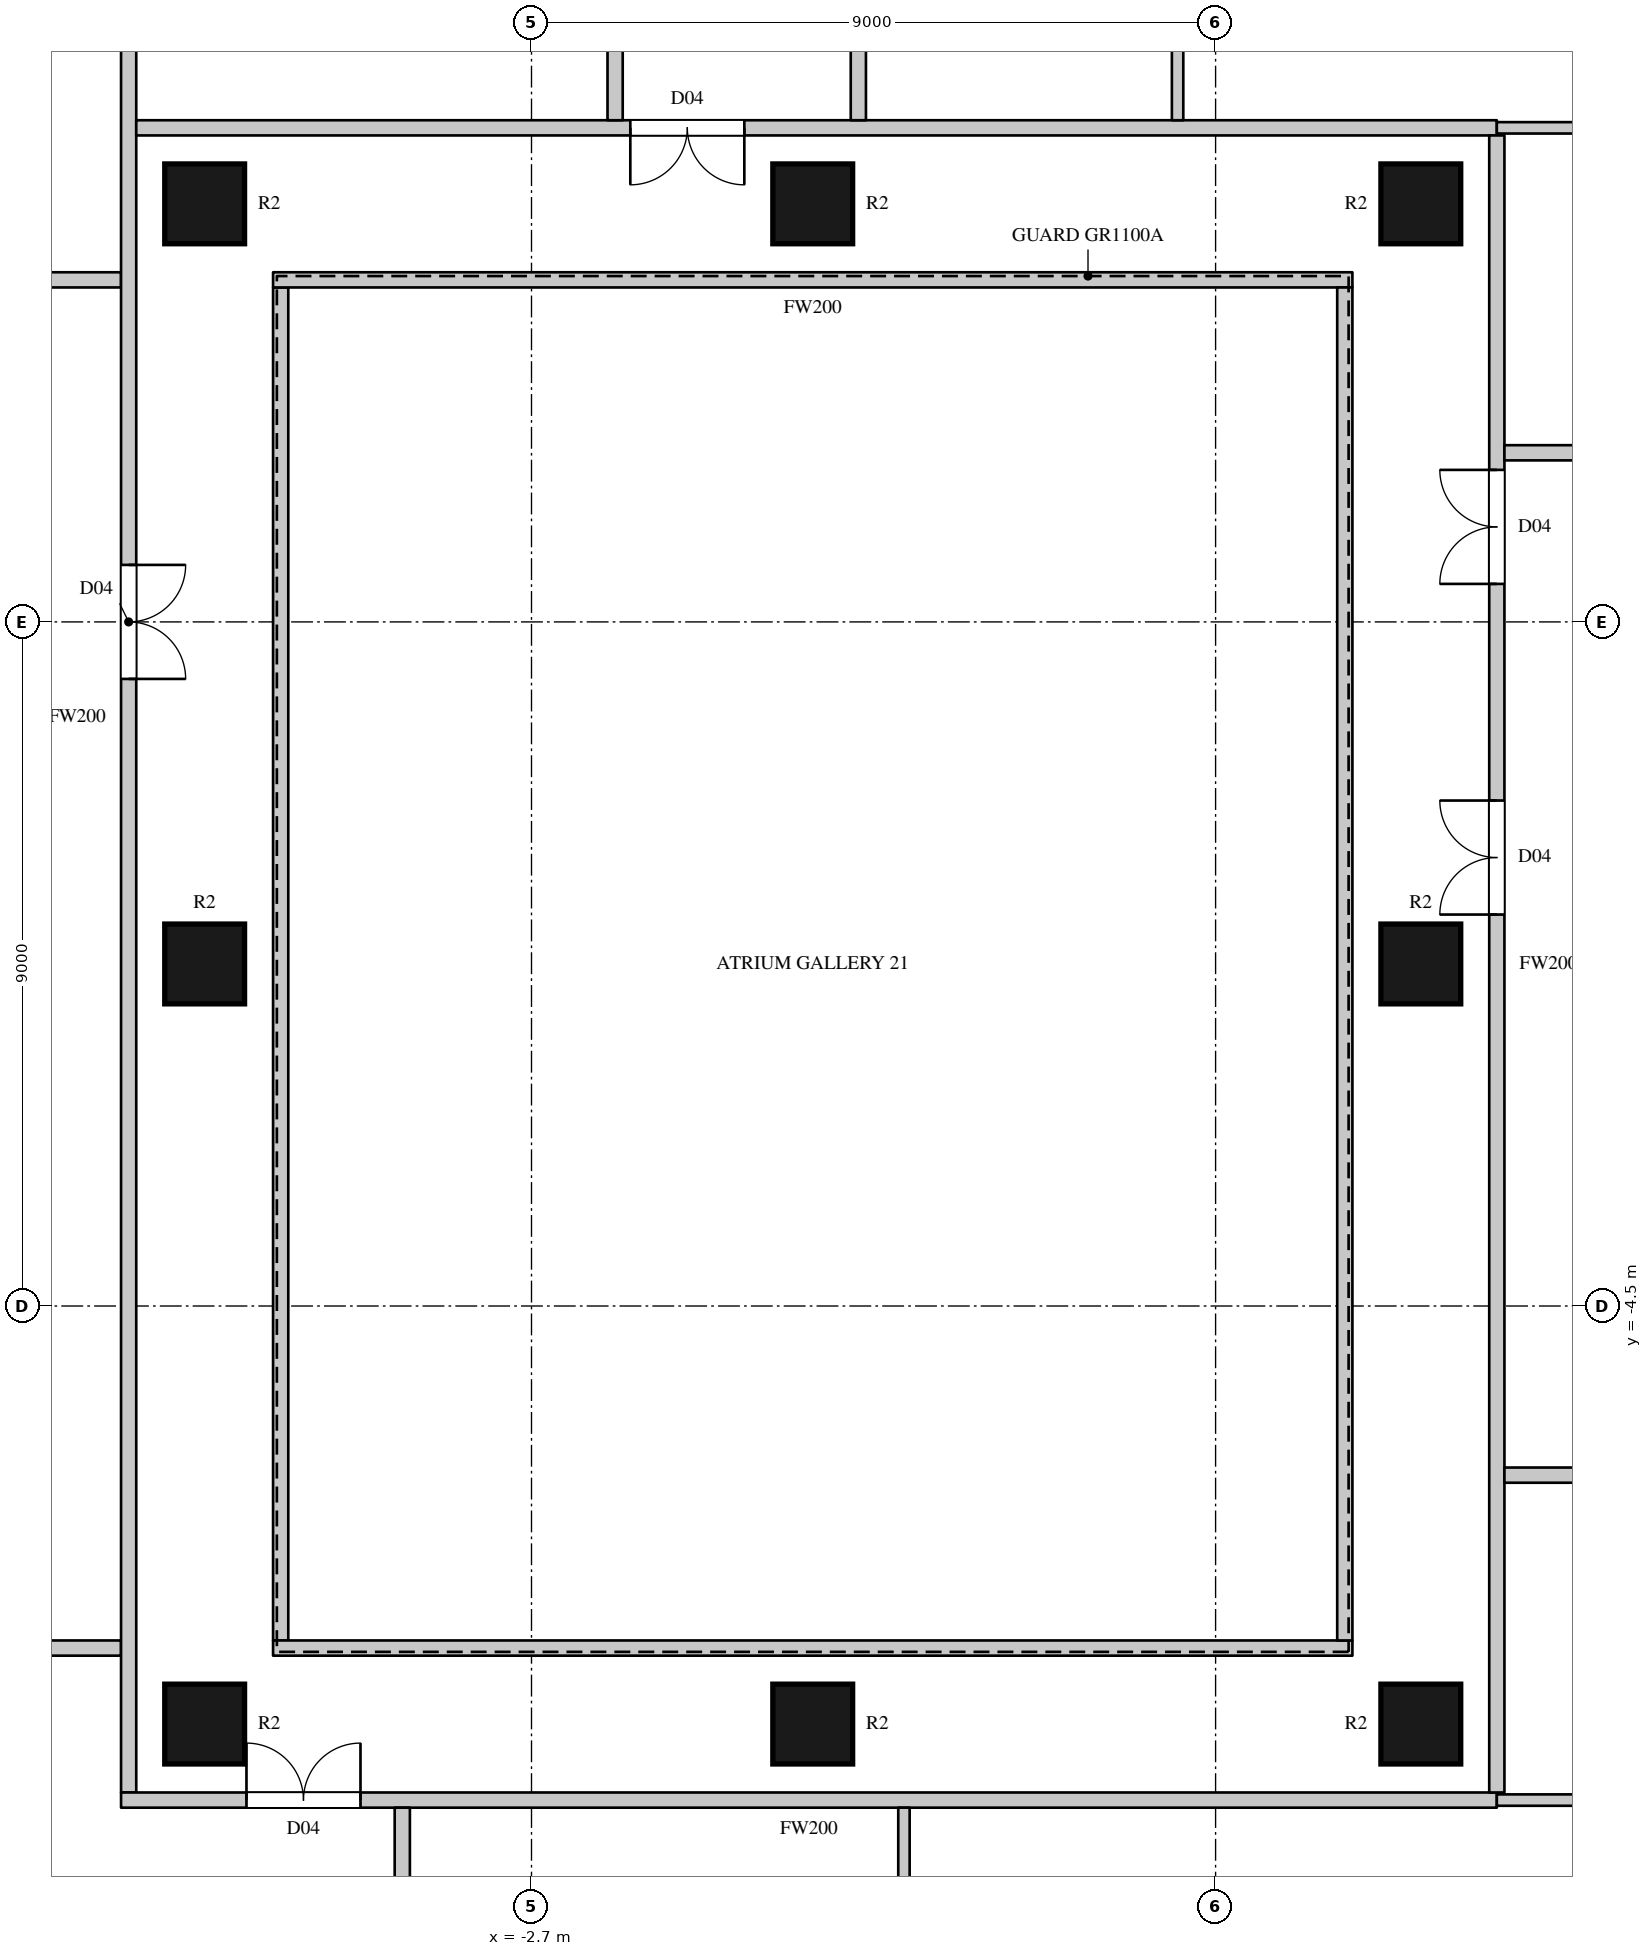
"""IFC4 building model, lengths in metres.
Left out: names, types, materials, properties, quantities, classifications, styles, units other than length and angle.
Written with IfcOpenShell. Run it as: python <this file> out.ifc"""

import sys

from ifc_helpers import new_model, si_unit, direction, frame, frame_2d, origin, origin_2d, place, context, subcontext, project, spatial, rectangle, circle, extrude, element, fill, save


model = new_model("IFC4")
c1 = context("Model", 3, precision=1e-05, world=origin(), true_north=direction((0.0, 1.0)))
c2 = subcontext(c1, "Body", "Model", "MODEL_VIEW")
j1 = project(units=[si_unit("LENGTHUNIT", "METRE"), si_unit("PLANEANGLEUNIT", "RADIAN")], contexts=[c1])
p1 = place(None, origin())
s1 = spatial("IfcSite", under=j1, at=p1, CompositionType="ELEMENT")
p2 = place(p1, origin())
s2 = spatial("IfcBuilding", under=s1, at=p2, CompositionType="ELEMENT")
p3 = place(p2, frame((0.0, 0.0, 105.9)))
s3 = spatial("IfcBuildingStorey", under=s2, at=p3, CompositionType="ELEMENT", Elevation=105.9)
for number, where, z_axis, x_axis in (
    (1, (-7.0, -10.0, 0.0), (0.0, 0.0, 1.0), (1.0, 0.0, 0.0)),
    (2, (-7.0, 0.0, 0.0), (0.0, 0.0, 1.0), (1.0, 0.0, 0.0)),
    (3, (-7.0, 10.0, 0.0), (0.0, 0.0, 1.0), (1.0, 0.0, 0.0)),
    (4, (1.0, -10.0, 0.0), (0.0, 0.0, 1.0), (1.0, 0.0, 0.0)),
    (5, (1.0, 10.0, 0.0), (0.0, 0.0, 1.0), (1.0, 0.0, 0.0)),
    (6, (9.0, -10.0, 0.0), (0.0, 0.0, 1.0), (1.0, 0.0, 0.0)),
    (7, (9.0, 0.0, 0.0), (0.0, 0.0, 1.0), (1.0, 0.0, 0.0)),
    (8, (9.0, 10.0, 0.0), (0.0, 0.0, 1.0), (1.0, 0.0, 0.0)),
):
    element("IfcColumn", number, at=place(p3, frame(where, z_axis=z_axis, x_axis=x_axis)), inside=s3, PredefinedType="COLUMN", context=c2, shape_type="SweptSolid", body=[
        extrude(circle(Radius=0.525, at=origin_2d()), origin(), (0.0, 0.0, 1.0), 3.6),
    ])
p4 = place(p3, frame((-13.97, -9.0, 0.0), z_axis=(0.0, 0.0, 1.0), x_axis=(1.0, 0.0, 0.0)))
e9 = element("IfcWall", 9, at=p4, inside=s3, PredefinedType="PARTITIONING", context=c2, shape_type="SweptSolid", body=[
    extrude(rectangle(XDim=5.87, YDim=0.2, at=frame_2d((2.935, 0.0))), origin(), (0.0, 0.0, 1.0), 3.3),
])
p5 = place(p4, frame((0.4, 0.0, 0.0)))
e10 = element("IfcOpeningElement", 10, at=p5, cuts=e9, PredefinedType="OPENING", context=c2, shape_type="SweptSolid", body=[
    extrude(rectangle(XDim=1.5, YDim=2.2, at=frame_2d((0.75, 1.1))), frame((0.0, 0.11, 0.0), z_axis=(0.0, -1.0, 0.0), x_axis=(1.0, 0.0, 0.0)), (0.0, 0.0, 1.0), 0.22),
])
p6 = place(p4, frame((2.05, 0.0, 0.0)))
e11 = element("IfcOpeningElement", 11, at=p6, cuts=e9, PredefinedType="OPENING", context=c2, shape_type="SweptSolid", body=[
    extrude(rectangle(XDim=1.5, YDim=2.2, at=frame_2d((0.75, 1.1))), frame((0.0, 0.11, 0.0), z_axis=(0.0, -1.0, 0.0), x_axis=(1.0, 0.0, 0.0)), (0.0, 0.0, 1.0), 0.22),
])
p7 = place(p3, frame((-13.97, 9.0, 0.0), z_axis=(0.0, 0.0, 1.0), x_axis=(1.0, 0.0, 0.0)))
e12 = element("IfcWall", 12, at=p7, inside=s3, PredefinedType="PARTITIONING", context=c2, shape_type="SweptSolid", body=[
    extrude(rectangle(XDim=5.87, YDim=0.2, at=frame_2d((2.935, 0.0))), origin(), (0.0, 0.0, 1.0), 3.3),
])
p8 = place(p3, frame((-8.0, -10.9, 0.0), z_axis=(0.0, 0.0, 1.0), x_axis=(0.0, 1.0, 0.0)))
e13 = element("IfcWall", 13, at=p8, inside=s3, PredefinedType="PARTITIONING", context=c2, shape_type="SweptSolid", body=[
    extrude(rectangle(XDim=28.3, YDim=0.2, at=frame_2d((14.15, 0.0))), origin(), (0.0, 0.0, 1.0), 3.3),
])
p9 = place(p8, frame((14.65, 0.0, 0.0)))
e14 = element("IfcOpeningElement", 14, at=p9, cuts=e13, PredefinedType="OPENING", context=c2, shape_type="SweptSolid", body=[
    extrude(rectangle(XDim=1.5, YDim=2.2, at=frame_2d((0.75, 1.1))), frame((0.0, 0.11, 0.0), z_axis=(0.0, -1.0, 0.0), x_axis=(1.0, 0.0, 0.0)), (0.0, 0.0, 1.0), 0.22),
])
p10 = place(p8, frame((26.55, 0.0, 0.0)))
e15 = element("IfcOpeningElement", 15, at=p10, cuts=e13, PredefinedType="OPENING", context=c2, shape_type="SweptSolid", body=[
    extrude(rectangle(XDim=1.6, YDim=2.4, at=frame_2d((0.8, 1.2))), frame((0.0, 0.11, 0.0), z_axis=(0.0, -1.0, 0.0), x_axis=(1.0, 0.0, 0.0)), (0.0, 0.0, 1.0), 0.22),
])
p11 = place(p3, frame((-8.1, -11.0, 0.0), z_axis=(0.0, 0.0, 1.0), x_axis=(1.0, 0.0, 0.0)))
e16 = element("IfcWall", 16, at=p11, inside=s3, PredefinedType="PARTITIONING", context=c2, shape_type="SweptSolid", body=[
    extrude(rectangle(XDim=18.1, YDim=0.2, at=frame_2d((9.05, 0.0))), origin(), (0.0, 0.0, 1.0), 3.3),
])
p12 = place(p11, frame((1.65, 0.0, 0.0)))
e17 = element("IfcOpeningElement", 17, at=p12, cuts=e16, PredefinedType="OPENING", context=c2, shape_type="SweptSolid", body=[
    extrude(rectangle(XDim=1.5, YDim=2.2, at=frame_2d((0.75, 1.1))), frame((0.0, 0.11, 0.0), z_axis=(0.0, -1.0, 0.0), x_axis=(1.0, 0.0, 0.0)), (0.0, 0.0, 1.0), 0.22),
])
p13 = place(p3, frame((-7.9, 11.0, 0.0), z_axis=(0.0, 0.0, 1.0), x_axis=(1.0, 0.0, 0.0)))
e18 = element("IfcWall", 18, at=p13, inside=s3, PredefinedType="PARTITIONING", context=c2, shape_type="SweptSolid", body=[
    extrude(rectangle(XDim=17.9, YDim=0.2, at=frame_2d((8.95, 0.0))), origin(), (0.0, 0.0, 1.0), 3.3),
])
p14 = place(p13, frame((6.5, 0.0, 0.0)))
e19 = element("IfcOpeningElement", 19, at=p14, cuts=e18, PredefinedType="OPENING", context=c2, shape_type="SweptSolid", body=[
    extrude(rectangle(XDim=1.5, YDim=2.2, at=frame_2d((0.75, 1.1))), frame((0.0, 0.11, 0.0), z_axis=(0.0, -1.0, 0.0), x_axis=(1.0, 0.0, 0.0)), (0.0, 0.0, 1.0), 0.22),
])
p15 = place(p3, frame((-6.0, -8.9, 0.0), z_axis=(0.0, 0.0, 1.0), x_axis=(0.0, 1.0, 0.0)))
e20 = element("IfcWall", 20, at=p15, inside=s3, PredefinedType="PARTITIONING", context=c2, shape_type="SweptSolid", body=[
    extrude(rectangle(XDim=17.8, YDim=0.2, at=frame_2d((8.9, 0.0))), origin(), (0.0, 0.0, 1.0), 3.3),
])
for number, where, z_axis, x_axis in (
    (21, (-6.1, -9.0, 0.0), (0.0, 0.0, 1.0), (1.0, 0.0, 0.0)),
    (22, (-6.1, 9.0, 0.0), (0.0, 0.0, 1.0), (1.0, 0.0, 0.0)),
):
    element("IfcWall", number, at=place(p3, frame(where, z_axis=z_axis, x_axis=x_axis)), inside=s3, PredefinedType="PARTITIONING", context=c2, shape_type="SweptSolid", body=[
        extrude(rectangle(XDim=14.2, YDim=0.2, at=frame_2d((7.1, 0.0))), origin(), (0.0, 0.0, 1.0), 3.3),
    ])
p16 = place(p3, frame((-4.4, -17.4, 0.0), z_axis=(0.0, 0.0, 1.0), x_axis=(0.0, 1.0, 0.0)))
e23 = element("IfcWall", 23, at=p16, inside=s3, PredefinedType="PARTITIONING", context=c2, shape_type="SweptSolid", body=[
    extrude(rectangle(XDim=6.3, YDim=0.2, at=frame_2d((3.15, 0.0))), origin(), (0.0, 0.0, 1.0), 3.3),
])
p17 = place(p16, frame((0.15, 0.0, 0.0)))
e24 = element("IfcOpeningElement", 24, at=p17, cuts=e23, PredefinedType="OPENING", context=c2, shape_type="SweptSolid", body=[
    extrude(rectangle(XDim=1.6, YDim=2.4, at=frame_2d((0.8, 1.2))), frame((0.0, 0.11, 0.0), z_axis=(0.0, -1.0, 0.0), x_axis=(1.0, 0.0, 0.0)), (0.0, 0.0, 1.0), 0.22),
])
p18 = place(p3, frame((-1.6, 11.1, 0.0), z_axis=(0.0, 0.0, 1.0), x_axis=(0.0, 1.0, 0.0)))
e25 = element("IfcWall", 25, at=p18, inside=s3, PredefinedType="PARTITIONING", context=c2, shape_type="SweptSolid", body=[
    extrude(rectangle(XDim=6.3, YDim=0.2, at=frame_2d((3.15, 0.0))), origin(), (0.0, 0.0, 1.0), 3.3),
])
p19 = place(p3, frame((1.6, 11.1, 0.0), z_axis=(0.0, 0.0, 1.0), x_axis=(0.0, 1.0, 0.0)))
e26 = element("IfcWall", 26, at=p19, inside=s3, PredefinedType="PARTITIONING", context=c2, shape_type="SweptSolid", body=[
    extrude(rectangle(XDim=6.3, YDim=0.2, at=frame_2d((3.15, 0.0))), origin(), (0.0, 0.0, 1.0), 3.3),
])
p20 = place(p19, frame((5.25, 0.0, 0.0)))
e27 = element("IfcOpeningElement", 27, at=p20, cuts=e26, PredefinedType="OPENING", context=c2, shape_type="SweptSolid", body=[
    extrude(rectangle(XDim=0.9, YDim=2.2, at=frame_2d((0.45, 1.1))), frame((0.0, 0.11, 0.0), z_axis=(0.0, -1.0, 0.0), x_axis=(1.0, 0.0, 0.0)), (0.0, 0.0, 1.0), 0.22),
])
p21 = place(p3, frame((8.0, -8.9, 0.0), z_axis=(0.0, 0.0, 1.0), x_axis=(0.0, 1.0, 0.0)))
e28 = element("IfcWall", 28, at=p21, inside=s3, PredefinedType="PARTITIONING", context=c2, shape_type="SweptSolid", body=[
    extrude(rectangle(XDim=17.8, YDim=0.2, at=frame_2d((8.9, 0.0))), origin(), (0.0, 0.0, 1.0), 3.3),
])
p22 = place(p3, frame((10.0, -10.9, 0.0), z_axis=(0.0, 0.0, 1.0), x_axis=(0.0, 1.0, 0.0)))
e29 = element("IfcWall", 29, at=p22, inside=s3, PredefinedType="PARTITIONING", context=c2, shape_type="SweptSolid", body=[
    extrude(rectangle(XDim=21.8, YDim=0.2, at=frame_2d((10.9, 0.0))), origin(), (0.0, 0.0, 1.0), 3.3),
])
p23 = place(p22, frame((15.9, 0.0, 0.0)))
e30 = element("IfcOpeningElement", 30, at=p23, cuts=e29, PredefinedType="OPENING", context=c2, shape_type="SweptSolid", body=[
    extrude(rectangle(XDim=1.5, YDim=2.2, at=frame_2d((0.75, 1.1))), frame((0.0, 0.11, 0.0), z_axis=(0.0, -1.0, 0.0), x_axis=(1.0, 0.0, 0.0)), (0.0, 0.0, 1.0), 0.22),
])
p24 = place(p22, frame((11.55, 0.0, 0.0)))
e31 = element("IfcOpeningElement", 31, at=p24, cuts=e29, PredefinedType="OPENING", context=c2, shape_type="SweptSolid", body=[
    extrude(rectangle(XDim=1.5, YDim=2.2, at=frame_2d((0.75, 1.1))), frame((0.0, 0.11, 0.0), z_axis=(0.0, -1.0, 0.0), x_axis=(1.0, 0.0, 0.0)), (0.0, 0.0, 1.0), 0.22),
])
p25 = place(p3, frame((10.1, -6.725, 0.0), z_axis=(0.0, 0.0, 1.0), x_axis=(1.0, 0.0, 0.0)))
e32 = element("IfcWall", 32, at=p25, inside=s3, PredefinedType="PARTITIONING", context=c2, shape_type="SweptSolid", body=[
    extrude(rectangle(XDim=6.1, YDim=0.2, at=frame_2d((3.05, 0.0))), origin(), (0.0, 0.0, 1.0), 3.3),
])
p26 = place(p25, frame((4.85, 0.0, 0.0)))
e33 = element("IfcOpeningElement", 33, at=p26, cuts=e32, PredefinedType="OPENING", context=c2, shape_type="SweptSolid", body=[
    extrude(rectangle(XDim=0.9, YDim=2.2, at=frame_2d((0.45, 1.1))), frame((0.0, 0.11, 0.0), z_axis=(0.0, -1.0, 0.0), x_axis=(1.0, 0.0, 0.0)), (0.0, 0.0, 1.0), 0.22),
])
p27 = place(p3, frame((10.1, 6.725, 0.0), z_axis=(0.0, 0.0, 1.0), x_axis=(1.0, 0.0, 0.0)))
e34 = element("IfcWall", 34, at=p27, inside=s3, PredefinedType="PARTITIONING", context=c2, shape_type="SweptSolid", body=[
    extrude(rectangle(XDim=6.1, YDim=0.2, at=frame_2d((3.05, 0.0))), origin(), (0.0, 0.0, 1.0), 3.3),
])
p28 = place(p27, frame((4.9, 0.0, 0.0)))
e35 = element("IfcOpeningElement", 35, at=p28, cuts=e34, PredefinedType="OPENING", context=c2, shape_type="SweptSolid", body=[
    extrude(rectangle(XDim=0.9, YDim=2.2, at=frame_2d((0.45, 1.1))), frame((0.0, 0.11, 0.0), z_axis=(0.0, -1.0, 0.0), x_axis=(1.0, 0.0, 0.0)), (0.0, 0.0, 1.0), 0.22),
])
p29 = place(p3, frame((2.2, -17.4, 0.0), z_axis=(0.0, 0.0, 1.0), x_axis=(0.0, 1.0, 0.0)))
e36 = element("IfcWall", 36, at=p29, inside=s3, PredefinedType="PARTITIONING", context=c2, shape_type="SweptSolid", body=[
    extrude(rectangle(XDim=6.3, YDim=0.15, at=frame_2d((3.15, 0.0))), origin(), (0.0, 0.0, 1.0), 3.3),
])
p30 = place(p3, frame((5.8, 11.1, 0.0), z_axis=(0.0, 0.0, 1.0), x_axis=(0.0, 1.0, 0.0)))
e37 = element("IfcWall", 37, at=p30, inside=s3, PredefinedType="PARTITIONING", context=c2, shape_type="SweptSolid", body=[
    extrude(rectangle(XDim=6.108, YDim=0.15, at=frame_2d((3.054, 0.0))), origin(), (0.0, 0.0, 1.0), 3.3),
])
for number, where, z_axis, x_axis in (
    (38, (10.0, -11.0, 0.0), (0.0, 0.0, 1.0), (1.0, 0.0, 0.0)),
    (39, (10.0, 11.0, 0.0), (0.0, 0.0, 1.0), (1.0, 0.0, 0.0)),
):
    element("IfcWall", number, at=place(p3, frame(where, z_axis=z_axis, x_axis=x_axis)), inside=s3, PredefinedType="PARTITIONING", context=c2, shape_type="SweptSolid", body=[
        extrude(rectangle(XDim=6.0, YDim=0.15, at=frame_2d((3.0, 0.0))), origin(), (0.0, 0.0, 1.0), 3.3),
    ])
p31 = place(p9, origin())
e40 = element("IfcDoor", 40, at=p31, inside=s3, OperationType="DOUBLE_DOOR_SINGLE_SWING", PredefinedType="DOOR", context=c2, shape_type="SweptSolid", body=[
    extrude(rectangle(XDim=1.5, YDim=2.2, at=frame_2d((0.75, 1.1))), frame((0.0, 0.025, 0.0), z_axis=(0.0, -1.0, 0.0), x_axis=(1.0, 0.0, 0.0)), (0.0, 0.0, 1.0), 0.05),
])
fill(e14, e40)
p32 = place(p12, origin())
e41 = element("IfcDoor", 41, at=p32, inside=s3, OperationType="DOUBLE_DOOR_SINGLE_SWING", PredefinedType="DOOR", context=c2, shape_type="SweptSolid", body=[
    extrude(rectangle(XDim=1.5, YDim=2.2, at=frame_2d((0.75, 1.1))), frame((0.0, 0.025, 0.0), z_axis=(0.0, -1.0, 0.0), x_axis=(1.0, 0.0, 0.0)), (0.0, 0.0, 1.0), 0.05),
])
fill(e17, e41)
p33 = place(p14, origin())
e42 = element("IfcDoor", 42, at=p33, inside=s3, OperationType="DOUBLE_DOOR_SINGLE_SWING", PredefinedType="DOOR", context=c2, shape_type="SweptSolid", body=[
    extrude(rectangle(XDim=1.5, YDim=2.2, at=frame_2d((0.75, 1.1))), frame((0.0, 0.025, 0.0), z_axis=(0.0, -1.0, 0.0), x_axis=(1.0, 0.0, 0.0)), (0.0, 0.0, 1.0), 0.05),
])
fill(e19, e42)
p34 = place(p23, origin())
e43 = element("IfcDoor", 43, at=p34, inside=s3, OperationType="DOUBLE_DOOR_SINGLE_SWING", PredefinedType="DOOR", context=c2, shape_type="SweptSolid", body=[
    extrude(rectangle(XDim=1.5, YDim=2.2, at=frame_2d((0.75, 1.1))), frame((0.0, 0.025, 0.0), z_axis=(0.0, -1.0, 0.0), x_axis=(1.0, 0.0, 0.0)), (0.0, 0.0, 1.0), 0.05),
])
fill(e30, e43)
p35 = place(p24, origin())
e44 = element("IfcDoor", 44, at=p35, inside=s3, OperationType="DOUBLE_DOOR_SINGLE_SWING", PredefinedType="DOOR", context=c2, shape_type="SweptSolid", body=[
    extrude(rectangle(XDim=1.5, YDim=2.2, at=frame_2d((0.75, 1.1))), frame((0.0, 0.025, 0.0), z_axis=(0.0, -1.0, 0.0), x_axis=(1.0, 0.0, 0.0)), (0.0, 0.0, 1.0), 0.05),
])
fill(e31, e44)
save(model, sys.argv[1])
